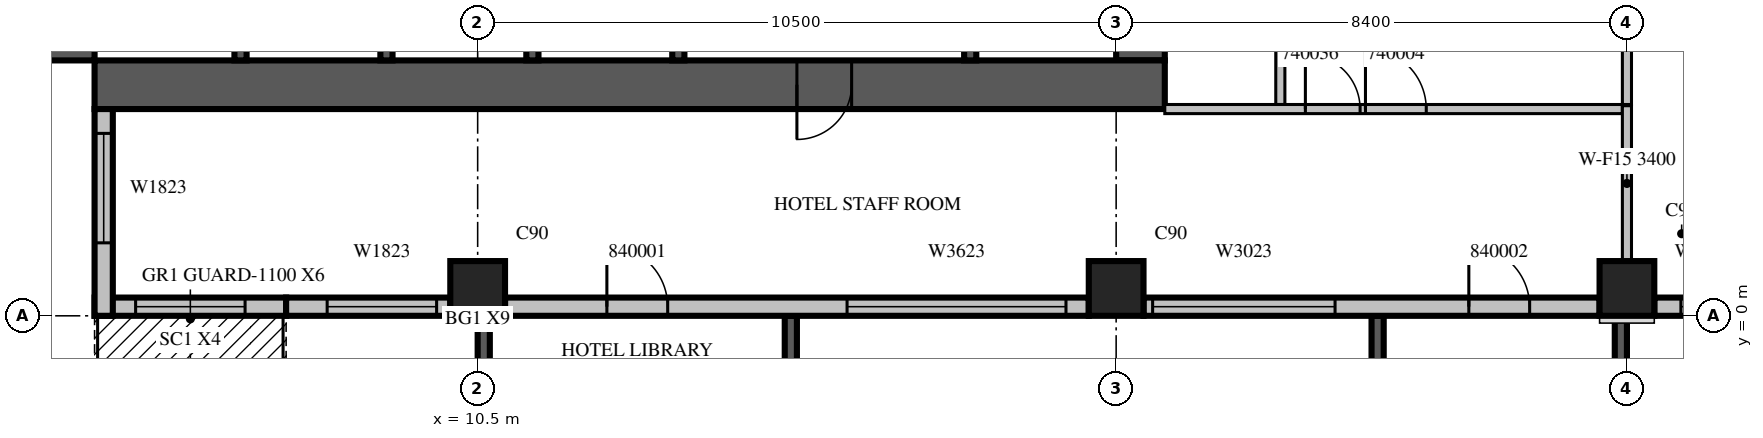
"""IFC4 building model, lengths in metres.
Left out: names, types, materials, properties, quantities, classifications, styles, units other than length and angle.
Written with IfcOpenShell. Run it as: python <this file> out.ifc"""

import sys

from ifc_helpers import new_model, si_unit, direction, frame, frame_2d, origin, origin_2d, place, context, subcontext, project, spatial, rectangle, extrude, source, transform, mapped, element, fill, save


model = new_model("IFC4")
c1 = context("Model", 3, precision=1e-05, world=origin(), true_north=direction((0.0, 1.0)))
c2 = subcontext(c1, "Body", "Model", "MODEL_VIEW")
j1 = project(units=[si_unit("LENGTHUNIT", "METRE"), si_unit("PLANEANGLEUNIT", "RADIAN")], contexts=[c1])
p1 = place(None, origin())
s1 = spatial("IfcSite", under=j1, at=p1, CompositionType="ELEMENT")
p2 = place(p1, origin())
s2 = spatial("IfcBuilding", under=s1, at=p2, CompositionType="ELEMENT")
p3 = place(p2, frame((0.0, 0.0, 185.4)))
s3 = spatial("IfcBuildingStorey", under=s2, at=p3, CompositionType="ELEMENT", Elevation=185.4)
m1 = source(origin(), c2, "Body", "SweptSolid", [
    extrude(rectangle(XDim=0.9, YDim=0.9, at=origin_2d()), origin(), (0.0, 0.0, 1.0), 3.8),
])
for number, where, z_axis, x_axis in (
    (1, (10.5, 0.45, 0.0), (0.0, 0.0, 1.0), (1.0, 0.0, 0.0)),
    (2, (21.0, 0.45, 0.0), (0.0, 0.0, 1.0), (1.0, 0.0, 0.0)),
    (3, (29.4, 0.45, 0.0), (0.0, 0.0, 1.0), (1.0, 0.0, 0.0)),
):
    element("IfcColumn", number, at=place(p3, frame(where, z_axis=z_axis, x_axis=x_axis)), inside=s3, PredefinedType="COLUMN", context=c2, shape_type="MappedRepresentation", body=[
        mapped(m1, transform((0.0, 0.0, 0.0), scale=1.0)),
    ])
m2 = source(origin(), c2, "Body", "SweptSolid", [
    extrude(rectangle(XDim=17.6, YDim=0.8, at=frame_2d((8.8, 0.0))), origin(), (0.0, 0.0, 1.0), 3.8),
])
p4 = place(p3, frame((3.8, 4.2, 0.0), z_axis=(0.0, 0.0, 1.0), x_axis=(0.0, 1.0, 0.0)))
e4 = element("IfcWall", 4, at=p4, inside=s3, PredefinedType="SHEAR", context=c2, shape_type="MappedRepresentation", body=[
    mapped(m2, transform((0.0, 0.0, 0.0), scale=1.0)),
])
m3 = source(origin(), c2, "Body", "SweptSolid", [
    extrude(rectangle(XDim=2.2, YDim=2.1, at=frame_2d((1.1, 1.05))), frame((0.0, 0.41, 0.0), z_axis=(0.0, -1.0, 0.0), x_axis=(1.0, 0.0, 0.0)), (0.0, 0.0, 1.0), 0.82),
])
p5 = place(p4, frame((4.2, 0.0, 0.0)))
e5 = element("IfcOpeningElement", 5, at=p5, cuts=e4, PredefinedType="OPENING", context=c2, shape_type="MappedRepresentation", body=[
    mapped(m3, transform((0.0, 0.0, 0.0), scale=1.0)),
])
m4 = source(origin(), c2, "Body", "SweptSolid", [
    extrude(rectangle(XDim=0.9, YDim=2.1, at=frame_2d((0.45, 1.05))), frame((0.0, 0.41, 0.0), z_axis=(0.0, -1.0, 0.0), x_axis=(1.0, 0.0, 0.0)), (0.0, 0.0, 1.0), 0.82),
])
p6 = place(p4, frame((10.95, 0.0, 0.0)))
e6 = element("IfcOpeningElement", 6, at=p6, cuts=e4, PredefinedType="OPENING", context=c2, shape_type="MappedRepresentation", body=[
    mapped(m4, transform((0.0, 0.0, 0.0), scale=1.0)),
])
m5 = source(origin(), c2, "Body", "SweptSolid", [
    extrude(rectangle(XDim=16.8, YDim=0.8, at=frame_2d((8.4, 0.0))), origin(), (0.0, 0.0, 1.0), 3.8),
])
p7 = place(p3, frame((21.4, 4.2, 0.0), z_axis=(0.0, 0.0, 1.0), x_axis=(0.0, 1.0, 0.0)))
e7 = element("IfcWall", 7, at=p7, inside=s3, PredefinedType="SHEAR", context=c2, shape_type="MappedRepresentation", body=[
    mapped(m5, transform((0.0, 0.0, 0.0), scale=1.0)),
])
p8 = place(p7, frame((4.2, 0.0, 0.0)))
e8 = element("IfcOpeningElement", 8, at=p8, cuts=e7, PredefinedType="OPENING", context=c2, shape_type="MappedRepresentation", body=[
    mapped(m3, transform((0.0, 0.0, 0.0), scale=1.0)),
])
m6 = source(origin(), c2, "Body", "SweptSolid", [
    extrude(rectangle(XDim=1.2, YDim=2.1, at=frame_2d((0.6, 1.05))), frame((0.0, 0.41, 0.0), z_axis=(0.0, -1.0, 0.0), x_axis=(1.0, 0.0, 0.0)), (0.0, 0.0, 1.0), 0.82),
])
p9 = place(p7, frame((14.7, 0.0, 0.0)))
e9 = element("IfcOpeningElement", 9, at=p9, cuts=e7, PredefinedType="OPENING", context=c2, shape_type="MappedRepresentation", body=[
    mapped(m6, transform((0.0, 0.0, 0.0), scale=1.0)),
])
p10 = place(p3, frame((4.2, 3.8, 0.0), z_axis=(0.0, 0.0, 1.0), x_axis=(1.0, 0.0, 0.0)))
e10 = element("IfcWall", 10, at=p10, inside=s3, PredefinedType="SHEAR", context=c2, shape_type="MappedRepresentation", body=[
    mapped(m2, transform((0.0, 0.0, 0.0), scale=1.0)),
])
p11 = place(p10, frame((11.55, 0.0, 0.0)))
e11 = element("IfcOpeningElement", 11, at=p11, cuts=e10, PredefinedType="OPENING", context=c2, shape_type="MappedRepresentation", body=[
    mapped(m4, transform((0.0, 0.0, 0.0), scale=1.0)),
])
m7 = source(origin(), c2, "Body", "SweptSolid", [
    extrude(rectangle(XDim=3.9, YDim=0.2, at=frame_2d((1.95, 0.0))), origin(), (0.0, 0.0, 1.0), 3.4),
])
p12 = place(p3, frame((10.6, 0.0, 0.0), z_axis=(0.0, 0.0, 1.0), x_axis=(0.0, -1.0, 0.0)))
e12 = element("IfcWall", 12, at=p12, inside=s3, PredefinedType="SOLIDWALL", context=c2, shape_type="MappedRepresentation", body=[
    mapped(m7, transform((0.0, 0.0, 0.0), scale=1.0)),
])
m8 = source(origin(), c2, "Body", "SweptSolid", [
    extrude(rectangle(XDim=2.4, YDim=2.3, at=frame_2d((1.2, 1.15))), frame((0.0, 0.11, 0.0), z_axis=(0.0, -1.0, 0.0), x_axis=(1.0, 0.0, 0.0)), (0.0, 0.0, 1.0), 0.22),
])
p13 = place(p12, frame((0.75, 0.0, 0.6)))
e13 = element("IfcOpeningElement", 13, at=p13, cuts=e12, PredefinedType="OPENING", context=c2, shape_type="MappedRepresentation", body=[
    mapped(m8, transform((0.0, 0.0, 0.0), scale=1.0)),
])
p14 = place(p3, frame((15.65, 0.0, 0.0), z_axis=(0.0, 0.0, 1.0), x_axis=(0.0, -1.0, 0.0)))
e14 = element("IfcWall", 14, at=p14, inside=s3, PredefinedType="SOLIDWALL", context=c2, shape_type="MappedRepresentation", body=[
    mapped(m7, transform((0.0, 0.0, 0.0), scale=1.0)),
])
p15 = place(p14, frame((0.75, 0.0, 0.6)))
e15 = element("IfcOpeningElement", 15, at=p15, cuts=e14, PredefinedType="OPENING", context=c2, shape_type="MappedRepresentation", body=[
    mapped(m8, transform((0.0, 0.0, 0.0), scale=1.0)),
])
p16 = place(p3, frame((25.3, 0.0, 0.0), z_axis=(0.0, 0.0, 1.0), x_axis=(0.0, -1.0, 0.0)))
e16 = element("IfcWall", 16, at=p16, inside=s3, PredefinedType="SOLIDWALL", context=c2, shape_type="MappedRepresentation", body=[
    mapped(m7, transform((0.0, 0.0, 0.0), scale=1.0)),
])
p17 = place(p16, frame((0.75, 0.0, 0.6)))
e17 = element("IfcOpeningElement", 17, at=p17, cuts=e16, PredefinedType="OPENING", context=c2, shape_type="MappedRepresentation", body=[
    mapped(m8, transform((0.0, 0.0, 0.0), scale=1.0)),
])
p18 = place(p3, frame((29.3, 0.0, 0.0), z_axis=(0.0, 0.0, 1.0), x_axis=(0.0, -1.0, 0.0)))
e18 = element("IfcWall", 18, at=p18, inside=s3, PredefinedType="SOLIDWALL", context=c2, shape_type="MappedRepresentation", body=[
    mapped(m7, transform((0.0, 0.0, 0.0), scale=1.0)),
])
p19 = place(p18, frame((0.75, 0.0, 0.6)))
e19 = element("IfcOpeningElement", 19, at=p19, cuts=e18, PredefinedType="OPENING", context=c2, shape_type="MappedRepresentation", body=[
    mapped(m8, transform((0.0, 0.0, 0.0), scale=1.0)),
])
m9 = source(origin(), c2, "Body", "SweptSolid", [
    extrude(rectangle(XDim=3.15, YDim=0.3, at=frame_2d((1.575, 0.0))), origin(), (0.0, 0.0, 1.0), 3.4),
])
p20 = place(p3, frame((4.2, 0.15, 0.0), z_axis=(0.0, 0.0, 1.0), x_axis=(1.0, 0.0, 0.0)))
e20 = element("IfcWall", 20, at=p20, inside=s3, PredefinedType="STANDARD", context=c2, shape_type="MappedRepresentation", body=[
    mapped(m9, transform((0.0, 0.0, 0.0), scale=1.0)),
])
m10 = source(origin(), c2, "Body", "SweptSolid", [
    extrude(rectangle(XDim=1.8, YDim=2.4, at=frame_2d((0.9, 1.2))), frame((0.0, 0.16, 0.0), z_axis=(0.0, -1.0, 0.0), x_axis=(1.0, 0.0, 0.0)), (0.0, 0.0, 1.0), 0.32),
])
p21 = place(p20, frame((0.675, 0.0, 0.0)))
e21 = element("IfcOpeningElement", 21, at=p21, cuts=e20, PredefinedType="OPENING", context=c2, shape_type="MappedRepresentation", body=[
    mapped(m10, transform((0.0, 0.0, 0.0), scale=1.0)),
])
m11 = source(origin(), c2, "Body", "SweptSolid", [
    extrude(rectangle(XDim=2.7, YDim=0.3, at=frame_2d((1.35, 0.0))), origin(), (0.0, 0.0, 1.0), 3.4),
])
p22 = place(p3, frame((7.35, 0.15, 0.0), z_axis=(0.0, 0.0, 1.0), x_axis=(1.0, 0.0, 0.0)))
e22 = element("IfcWall", 22, at=p22, inside=s3, PredefinedType="STANDARD", context=c2, shape_type="MappedRepresentation", body=[
    mapped(m11, transform((0.0, 0.0, 0.0), scale=1.0)),
])
m12 = source(origin(), c2, "Body", "SweptSolid", [
    extrude(rectangle(XDim=1.8, YDim=2.3, at=frame_2d((0.9, 1.15))), frame((0.0, 0.16, 0.0), z_axis=(0.0, -1.0, 0.0), x_axis=(1.0, 0.0, 0.0)), (0.0, 0.0, 1.0), 0.32),
])
p23 = place(p22, frame((0.675, 0.0, 0.6)))
e23 = element("IfcOpeningElement", 23, at=p23, cuts=e22, PredefinedType="OPENING", context=c2, shape_type="MappedRepresentation", body=[
    mapped(m12, transform((0.0, 0.0, 0.0), scale=1.0)),
])
m13 = source(origin(), c2, "Body", "SweptSolid", [
    extrude(rectangle(XDim=9.6, YDim=0.3, at=frame_2d((4.8, 0.0))), origin(), (0.0, 0.0, 1.0), 3.4),
])
p24 = place(p3, frame((10.95, 0.15, 0.0), z_axis=(0.0, 0.0, 1.0), x_axis=(1.0, 0.0, 0.0)))
e24 = element("IfcWall", 24, at=p24, inside=s3, PredefinedType="STANDARD", context=c2, shape_type="MappedRepresentation", body=[
    mapped(m13, transform((0.0, 0.0, 0.0), scale=1.0)),
])
m14 = source(origin(), c2, "Body", "SweptSolid", [
    extrude(rectangle(XDim=3.6, YDim=2.3, at=frame_2d((1.8, 1.15))), frame((0.0, 0.16, 0.0), z_axis=(0.0, -1.0, 0.0), x_axis=(1.0, 0.0, 0.0)), (0.0, 0.0, 1.0), 0.32),
])
p25 = place(p24, frame((5.625, 0.0, 0.6)))
e25 = element("IfcOpeningElement", 25, at=p25, cuts=e24, PredefinedType="OPENING", context=c2, shape_type="MappedRepresentation", body=[
    mapped(m14, transform((0.0, 0.0, 0.0), scale=1.0)),
])
m15 = source(origin(), c2, "Body", "SweptSolid", [
    extrude(rectangle(XDim=1.0, YDim=2.1, at=frame_2d((0.5, 1.05))), frame((0.0, 0.16, 0.0), z_axis=(0.0, -1.0, 0.0), x_axis=(1.0, 0.0, 0.0)), (0.0, 0.0, 1.0), 0.32),
])
p26 = place(p24, frame((1.675, 0.0, 0.0)))
e26 = element("IfcOpeningElement", 26, at=p26, cuts=e24, PredefinedType="OPENING", context=c2, shape_type="MappedRepresentation", body=[
    mapped(m15, transform((0.0, 0.0, 0.0), scale=1.0)),
])
m16 = source(origin(), c2, "Body", "SweptSolid", [
    extrude(rectangle(XDim=7.5, YDim=0.3, at=frame_2d((3.75, 0.0))), origin(), (0.0, 0.0, 1.0), 3.4),
])
p27 = place(p3, frame((21.45, 0.15, 0.0), z_axis=(0.0, 0.0, 1.0), x_axis=(1.0, 0.0, 0.0)))
e27 = element("IfcWall", 27, at=p27, inside=s3, PredefinedType="STANDARD", context=c2, shape_type="MappedRepresentation", body=[
    mapped(m16, transform((0.0, 0.0, 0.0), scale=1.0)),
])
m17 = source(origin(), c2, "Body", "SweptSolid", [
    extrude(rectangle(XDim=3.0, YDim=2.3, at=frame_2d((1.5, 1.15))), frame((0.0, 0.16, 0.0), z_axis=(0.0, -1.0, 0.0), x_axis=(1.0, 0.0, 0.0)), (0.0, 0.0, 1.0), 0.32),
])
p28 = place(p27, frame((0.15, 0.0, 0.6)))
e28 = element("IfcOpeningElement", 28, at=p28, cuts=e27, PredefinedType="OPENING", context=c2, shape_type="MappedRepresentation", body=[
    mapped(m17, transform((0.0, 0.0, 0.0), scale=1.0)),
])
p29 = place(p27, frame((5.35, 0.0, 0.0)))
e29 = element("IfcOpeningElement", 29, at=p29, cuts=e27, PredefinedType="OPENING", context=c2, shape_type="MappedRepresentation", body=[
    mapped(m15, transform((0.0, 0.0, 0.0), scale=1.0)),
])
p30 = place(p3, frame((29.85, 0.15, 0.0), z_axis=(0.0, 0.0, 1.0), x_axis=(1.0, 0.0, 0.0)))
e30 = element("IfcWall", 30, at=p30, inside=s3, PredefinedType="STANDARD", context=c2, shape_type="MappedRepresentation", body=[
    mapped(m16, transform((0.0, 0.0, 0.0), scale=1.0)),
])
m18 = source(origin(), c2, "Body", "SweptSolid", [
    extrude(rectangle(XDim=1.2, YDim=2.3, at=frame_2d((0.6, 1.15))), frame((0.0, 0.16, 0.0), z_axis=(0.0, -1.0, 0.0), x_axis=(1.0, 0.0, 0.0)), (0.0, 0.0, 1.0), 0.32),
])
p31 = place(p30, frame((0.438, 0.0, 0.6)))
e31 = element("IfcOpeningElement", 31, at=p31, cuts=e30, PredefinedType="OPENING", context=c2, shape_type="MappedRepresentation", body=[
    mapped(m18, transform((0.0, 0.0, 0.0), scale=1.0)),
])
p32 = place(p30, frame((5.963, 0.0, 0.6)))
e32 = element("IfcOpeningElement", 32, at=p32, cuts=e30, PredefinedType="OPENING", context=c2, shape_type="MappedRepresentation", body=[
    mapped(m18, transform((0.0, 0.0, 0.0), scale=1.0)),
])
m19 = source(origin(), c2, "Body", "SweptSolid", [
    extrude(rectangle(XDim=2.4, YDim=2.3, at=frame_2d((1.2, 1.15))), frame((0.0, 0.16, 0.0), z_axis=(0.0, -1.0, 0.0), x_axis=(1.0, 0.0, 0.0)), (0.0, 0.0, 1.0), 0.32),
])
p33 = place(p30, frame((2.6, 0.0, 0.6)))
e33 = element("IfcOpeningElement", 33, at=p33, cuts=e30, PredefinedType="OPENING", context=c2, shape_type="MappedRepresentation", body=[
    mapped(m19, transform((0.0, 0.0, 0.0), scale=1.0)),
])
m20 = source(origin(), c2, "Body", "SweptSolid", [
    extrude(rectangle(XDim=3.4, YDim=0.3, at=frame_2d((1.7, 0.0))), origin(), (0.0, 0.0, 1.0), 3.4),
])
p34 = place(p3, frame((4.35, 3.4, 0.0), z_axis=(0.0, 0.0, 1.0), x_axis=(0.0, -1.0, 0.0)))
e34 = element("IfcWall", 34, at=p34, inside=s3, PredefinedType="STANDARD", context=c2, shape_type="MappedRepresentation", body=[
    mapped(m20, transform((0.0, 0.0, 0.0), scale=1.0)),
])
p35 = place(p34, frame((0.4, 0.0, 0.6)))
e35 = element("IfcOpeningElement", 35, at=p35, cuts=e34, PredefinedType="OPENING", context=c2, shape_type="MappedRepresentation", body=[
    mapped(m12, transform((0.0, 0.0, 0.0), scale=1.0)),
])
m21 = source(origin(), c2, "Body", "SweptSolid", [
    extrude(rectangle(XDim=3.1, YDim=0.2, at=frame_2d((1.55, 0.0))), origin(), (0.0, 0.0, 1.0), 3.8),
])
for number, where, z_axis, x_axis in (
    (36, (6.6, 4.2, 0.0), (0.0, 0.0, 1.0), (0.0, 1.0, 0.0)),
    (37, (9.0, 4.2, 0.0), (0.0, 0.0, 1.0), (0.0, 1.0, 0.0)),
    (38, (11.4, 4.2, 0.0), (0.0, 0.0, 1.0), (0.0, 1.0, 0.0)),
):
    element("IfcWall", number, at=place(p3, frame(where, z_axis=z_axis, x_axis=x_axis)), inside=s3, PredefinedType="SOLIDWALL", context=c2, shape_type="MappedRepresentation", body=[
        mapped(m21, transform((0.0, 0.0, 0.0), scale=1.0)),
    ])
m22 = source(origin(), c2, "Body", "SweptSolid", [
    extrude(rectangle(XDim=3.1, YDim=0.2, at=frame_2d((1.55, 0.0))), origin(), (0.0, 0.0, 1.0), 3.4),
])
for number, where, z_axis, x_axis in (
    (39, (13.8, 4.2, 0.0), (0.0, 0.0, 1.0), (0.0, 1.0, 0.0)),
    (40, (18.6, 4.2, 0.0), (0.0, 0.0, 1.0), (0.0, 1.0, 0.0)),
):
    element("IfcWall", number, at=place(p3, frame(where, z_axis=z_axis, x_axis=x_axis)), inside=s3, PredefinedType="SOLIDWALL", context=c2, shape_type="MappedRepresentation", body=[
        mapped(m22, transform((0.0, 0.0, 0.0), scale=1.0)),
    ])
m23 = source(origin(), c2, "Body", "SweptSolid", [
    extrude(rectangle(XDim=11.525, YDim=0.15, at=frame_2d((5.763, 0.0))), origin(), (0.0, 0.0, 1.0), 3.4),
])
p36 = place(p3, frame((23.7, 15.0, 0.0), z_axis=(0.0, 0.0, 1.0), x_axis=(0.0, -1.0, 0.0)))
e41 = element("IfcWall", 41, at=p36, inside=s3, PredefinedType="PARTITIONING", context=c2, shape_type="MappedRepresentation", body=[
    mapped(m23, transform((0.0, 0.0, 0.0), scale=1.0)),
])
m24 = source(origin(), c2, "Body", "SweptSolid", [
    extrude(rectangle(XDim=0.9, YDim=2.1, at=frame_2d((0.45, 1.05))), frame((0.0, 0.085, 0.0), z_axis=(0.0, -1.0, 0.0), x_axis=(1.0, 0.0, 0.0)), (0.0, 0.0, 1.0), 0.17),
])
p37 = place(p36, frame((7.562, 0.0, 0.0)))
e42 = element("IfcOpeningElement", 42, at=p37, cuts=e41, PredefinedType="OPENING", context=c2, shape_type="MappedRepresentation", body=[
    mapped(m24, transform((0.0, 0.0, 0.0), scale=1.0)),
])
p38 = place(p36, frame((0.925, 0.0, 0.0)))
e43 = element("IfcOpeningElement", 43, at=p38, cuts=e41, PredefinedType="OPENING", context=c2, shape_type="MappedRepresentation", body=[
    mapped(m24, transform((0.0, 0.0, 0.0), scale=1.0)),
])
m25 = source(origin(), c2, "Body", "SweptSolid", [
    extrude(rectangle(XDim=6.576, YDim=0.15, at=frame_2d((3.288, 0.0))), origin(), (0.0, 0.0, 1.0), 3.4),
])
p39 = place(p3, frame((29.4, 3.475, 0.0), z_axis=(0.0, 0.0, 1.0), x_axis=(0.0, 1.0, 0.0)))
e44 = element("IfcWall", 44, at=p39, inside=s3, PredefinedType="PARTITIONING", context=c2, shape_type="MappedRepresentation", body=[
    mapped(m25, transform((0.0, 0.0, 0.0), scale=1.0)),
])
m26 = source(origin(), c2, "Body", "SweptSolid", [
    extrude(rectangle(XDim=7.525, YDim=0.15, at=frame_2d((3.763, 0.0))), origin(), (0.0, 0.0, 1.0), 3.4),
])
p40 = place(p3, frame((21.8, 3.4, 0.0), z_axis=(0.0, 0.0, 1.0), x_axis=(1.0, 0.0, 0.0)))
e45 = element("IfcWall", 45, at=p40, inside=s3, PredefinedType="PARTITIONING", context=c2, shape_type="MappedRepresentation", body=[
    mapped(m26, transform((0.0, 0.0, 0.0), scale=1.0)),
])
m27 = source(origin(), c2, "Body", "SweptSolid", [
    extrude(rectangle(XDim=1.0, YDim=2.1, at=frame_2d((0.5, 1.05))), frame((0.0, 0.085, 0.0), z_axis=(0.0, -1.0, 0.0), x_axis=(1.0, 0.0, 0.0)), (0.0, 0.0, 1.0), 0.17),
])
p41 = place(p40, frame((3.3, 0.0, 0.0)))
e46 = element("IfcOpeningElement", 46, at=p41, cuts=e45, PredefinedType="OPENING", context=c2, shape_type="MappedRepresentation", body=[
    mapped(m27, transform((0.0, 0.0, 0.0), scale=1.0)),
])
p42 = place(p40, frame((2.312, 0.0, 0.0)))
e47 = element("IfcOpeningElement", 47, at=p42, cuts=e45, PredefinedType="OPENING", context=c2, shape_type="MappedRepresentation", body=[
    mapped(m24, transform((0.0, 0.0, 0.0), scale=1.0)),
])
m28 = source(origin(), c2, "Body", "SweptSolid", [
    extrude(rectangle(XDim=2.556, YDim=0.15, at=frame_2d((1.278, 0.0))), origin(), (0.0, 0.0, 1.0), 3.4),
])
p43 = place(p3, frame((29.4, 0.899, 0.0), z_axis=(0.0, 0.0, 1.0), x_axis=(0.0, 1.0, 0.0)))
e48 = element("IfcWall", 48, at=p43, inside=s3, PredefinedType="PARTITIONING", context=c2, shape_type="MappedRepresentation", body=[
    mapped(m28, transform((0.0, 0.0, 0.0), scale=1.0)),
])
m29 = source(origin(), c2, "Body", "SweptSolid", [
    extrude(rectangle(XDim=1.8, YDim=2.4, at=frame_2d((0.9, 1.2))), frame((0.0, 0.025, 0.0), z_axis=(0.0, -1.0, 0.0), x_axis=(1.0, 0.0, 0.0)), (0.0, 0.0, 1.0), 0.05),
])
p44 = place(p21, origin())
e49 = element("IfcDoor", 49, at=p44, inside=s3, OperationType="SLIDING_TO_LEFT", PredefinedType="DOOR", context=c2, shape_type="MappedRepresentation", body=[
    mapped(m29, transform((0.0, 0.0, 0.0), scale=1.0)),
])
fill(e21, e49)
m30 = source(origin(), c2, "Body", "SweptSolid", [
    extrude(rectangle(XDim=1.8, YDim=2.3, at=frame_2d((0.9, 1.15))), frame((0.0, 0.03, 0.0), z_axis=(0.0, -1.0, 0.0), x_axis=(1.0, 0.0, 0.0)), (0.0, 0.0, 1.0), 0.06),
])
p45 = place(p23, origin())
e50 = element("IfcWindow", 50, at=p45, inside=s3, PartitioningType="SINGLE_PANEL", PredefinedType="WINDOW", context=c2, shape_type="MappedRepresentation", body=[
    mapped(m30, transform((0.0, 0.0, 0.0), scale=1.0)),
])
fill(e23, e50)
m31 = source(origin(), c2, "Body", "SweptSolid", [
    extrude(rectangle(XDim=3.6, YDim=2.3, at=frame_2d((1.8, 1.15))), frame((0.0, 0.03, 0.0), z_axis=(0.0, -1.0, 0.0), x_axis=(1.0, 0.0, 0.0)), (0.0, 0.0, 1.0), 0.06),
])
p46 = place(p25, origin())
e51 = element("IfcWindow", 51, at=p46, inside=s3, PartitioningType="SINGLE_PANEL", PredefinedType="WINDOW", context=c2, shape_type="MappedRepresentation", body=[
    mapped(m31, transform((0.0, 0.0, 0.0), scale=1.0)),
])
fill(e25, e51)
m32 = source(origin(), c2, "Body", "SweptSolid", [
    extrude(rectangle(XDim=3.0, YDim=2.3, at=frame_2d((1.5, 1.15))), frame((0.0, 0.03, 0.0), z_axis=(0.0, -1.0, 0.0), x_axis=(1.0, 0.0, 0.0)), (0.0, 0.0, 1.0), 0.06),
])
p47 = place(p28, origin())
e52 = element("IfcWindow", 52, at=p47, inside=s3, PartitioningType="SINGLE_PANEL", PredefinedType="WINDOW", context=c2, shape_type="MappedRepresentation", body=[
    mapped(m32, transform((0.0, 0.0, 0.0), scale=1.0)),
])
fill(e28, e52)
m33 = source(origin(), c2, "Body", "SweptSolid", [
    extrude(rectangle(XDim=1.2, YDim=2.3, at=frame_2d((0.6, 1.15))), frame((0.0, 0.03, 0.0), z_axis=(0.0, -1.0, 0.0), x_axis=(1.0, 0.0, 0.0)), (0.0, 0.0, 1.0), 0.06),
])
p48 = place(p31, origin())
e53 = element("IfcWindow", 53, at=p48, inside=s3, PartitioningType="SINGLE_PANEL", PredefinedType="WINDOW", context=c2, shape_type="MappedRepresentation", body=[
    mapped(m33, transform((0.0, 0.0, 0.0), scale=1.0)),
])
fill(e31, e53)
p49 = place(p35, origin())
e54 = element("IfcWindow", 54, at=p49, inside=s3, PartitioningType="SINGLE_PANEL", PredefinedType="WINDOW", context=c2, shape_type="MappedRepresentation", body=[
    mapped(m30, transform((0.0, 0.0, 0.0), scale=1.0)),
])
fill(e35, e54)
m34 = source(origin(), c2, "Body", "SweptSolid", [
    extrude(rectangle(XDim=0.9, YDim=2.1, at=frame_2d((0.45, 1.05))), frame((0.0, 0.025, 0.0), z_axis=(0.0, -1.0, 0.0), x_axis=(1.0, 0.0, 0.0)), (0.0, 0.0, 1.0), 0.05),
])
p50 = place(p11, origin())
e55 = element("IfcDoor", 55, at=p50, inside=s3, OperationType="SINGLE_SWING_RIGHT", PredefinedType="DOOR", context=c2, shape_type="MappedRepresentation", body=[
    mapped(m34, transform((0.0, 0.0, 0.0), scale=1.0)),
])
fill(e11, e55)
m35 = source(origin(), c2, "Body", "SweptSolid", [
    extrude(rectangle(XDim=1.0, YDim=2.1, at=frame_2d((0.5, 1.05))), frame((0.0, 0.025, 0.0), z_axis=(0.0, -1.0, 0.0), x_axis=(1.0, 0.0, 0.0)), (0.0, 0.0, 1.0), 0.05),
])
p51 = place(p41, origin())
e56 = element("IfcDoor", 56, at=p51, inside=s3, OperationType="SINGLE_SWING_LEFT", PredefinedType="DOOR", context=c2, shape_type="MappedRepresentation", body=[
    mapped(m35, transform((0.0, 0.0, 0.0), scale=1.0)),
])
fill(e46, e56)
p52 = place(p42, origin())
e57 = element("IfcDoor", 57, at=p52, inside=s3, OperationType="SINGLE_SWING_LEFT", PredefinedType="DOOR", context=c2, shape_type="MappedRepresentation", body=[
    mapped(m34, transform((0.0, 0.0, 0.0), scale=1.0)),
])
fill(e47, e57)
p53 = place(p26, origin())
e58 = element("IfcDoor", 58, at=p53, inside=s3, OperationType="SINGLE_SWING_LEFT", PredefinedType="DOOR", context=c2, shape_type="MappedRepresentation", body=[
    mapped(m35, transform((0.0, 0.0, 0.0), scale=1.0)),
])
fill(e26, e58)
p54 = place(p29, origin())
e59 = element("IfcDoor", 59, at=p54, inside=s3, OperationType="SINGLE_SWING_LEFT", PredefinedType="DOOR", context=c2, shape_type="MappedRepresentation", body=[
    mapped(m35, transform((0.0, 0.0, 0.0), scale=1.0)),
])
fill(e29, e59)
save(model, sys.argv[1])
